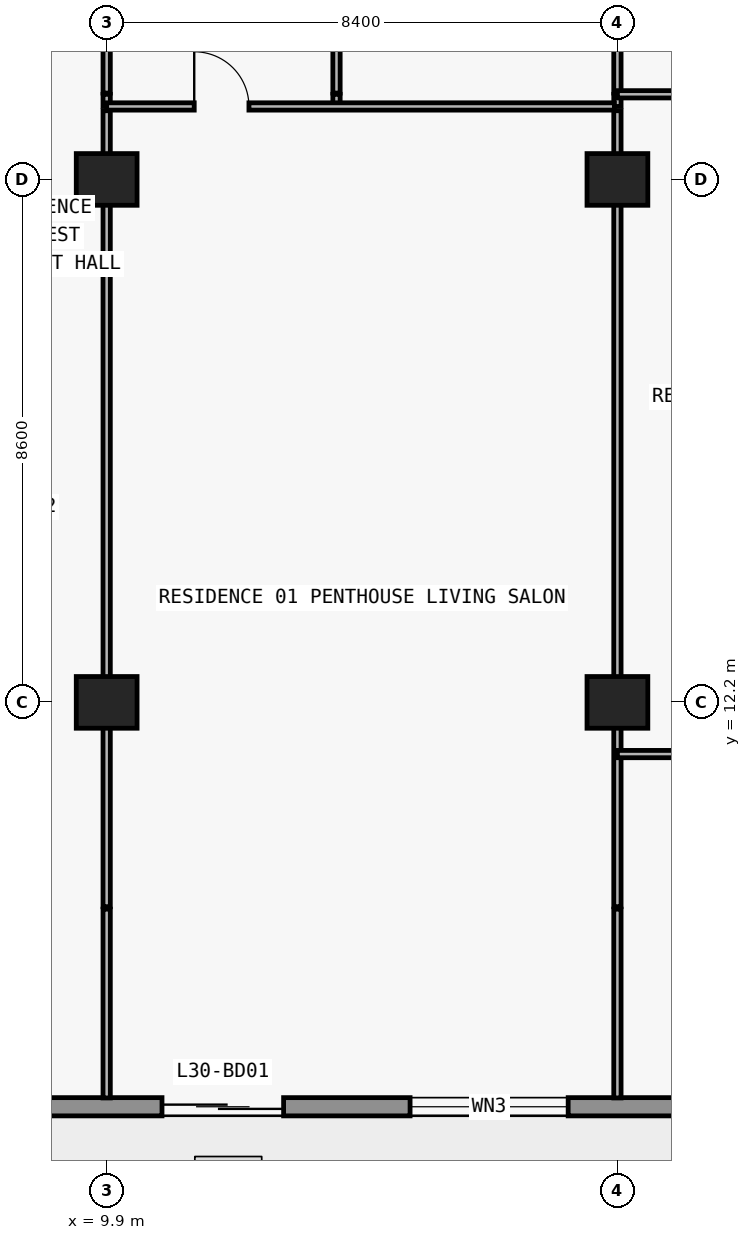
"""IFC4 building model, lengths in metres.
Left out: names, types, materials, properties, quantities, classifications, styles, units other than length and angle.
Written with IfcOpenShell. Run it as: python <this file> out.ifc"""

import sys

from ifc_helpers import new_model, si_unit, direction, frame, frame_2d, origin, origin_2d, place, context, subcontext, project, spatial, rectangle, extrude, element, fill, save


model = new_model("IFC4")
c1 = context("Model", 3, precision=1e-05, world=origin(), true_north=direction((0.0, 1.0)))
c2 = subcontext(c1, "Body", "Model", "MODEL_VIEW")
j1 = project(units=[si_unit("LENGTHUNIT", "METRE"), si_unit("PLANEANGLEUNIT", "RADIAN")], contexts=[c1])
p1 = place(None, origin())
s1 = spatial("IfcSite", under=j1, at=p1, CompositionType="ELEMENT")
p2 = place(p1, origin())
s2 = spatial("IfcBuilding", under=s1, at=p2, CompositionType="ELEMENT")
p3 = place(p2, frame((0.0, 0.0, 112.5)))
s3 = spatial("IfcBuildingStorey", under=s2, at=p3, CompositionType="ELEMENT", Elevation=112.5)
for number, where, z_axis, x_axis in (
    (1, (9.9, 12.2, 0.0), (0.0, 0.0, 1.0), (1.0, 0.0, 0.0)),
    (2, (18.3, 12.2, 0.0), (0.0, 0.0, 1.0), (1.0, 0.0, 0.0)),
    (3, (9.9, 20.8, 0.0), (0.0, 0.0, 1.0), (1.0, 0.0, 0.0)),
    (4, (18.3, 20.8, 0.0), (0.0, 0.0, 1.0), (1.0, 0.0, 0.0)),
):
    element("IfcColumn", number, at=place(p3, frame(where, z_axis=z_axis, x_axis=x_axis)), inside=s3, PredefinedType="COLUMN", context=c2, shape_type="SweptSolid", body=[
        extrude(rectangle(XDim=1.0, YDim=0.85, at=origin_2d()), origin(), (0.0, 0.0, 1.0), 3.05),
    ])
p4 = place(p3, frame((70.1, 5.55, 0.0), z_axis=(0.0, 0.0, 1.0), x_axis=(-1.0, 0.0, 0.0)))
e5 = element("IfcWall", 5, at=p4, inside=s3, PredefinedType="STANDARD", context=c2, shape_type="SweptSolid", body=[
    extrude(rectangle(XDim=62.4, YDim=0.3, at=frame_2d((31.2, 0.0))), origin(), (0.0, 0.0, 1.0), 3.05),
])
p5 = place(p4, frame((57.29, 0.0, 0.0)))
e6 = element("IfcOpeningElement", 6, at=p5, cuts=e5, PredefinedType="OPENING", context=c2, shape_type="SweptSolid", body=[
    extrude(rectangle(XDim=2.0, YDim=2.3, at=frame_2d((1.0, 1.15))), frame((0.0, 0.16, 0.0), z_axis=(0.0, -1.0, 0.0), x_axis=(1.0, 0.0, 0.0)), (0.0, 0.0, 1.0), 0.32),
])
p6 = place(p4, frame((52.61, 0.0, 0.65)))
e7 = element("IfcOpeningElement", 7, at=p6, cuts=e5, PredefinedType="OPENING", context=c2, shape_type="SweptSolid", body=[
    extrude(rectangle(XDim=2.6, YDim=1.85, at=frame_2d((1.3, 0.925))), frame((0.0, 0.16, 0.0), z_axis=(0.0, -1.0, 0.0), x_axis=(1.0, 0.0, 0.0)), (0.0, 0.0, 1.0), 0.32),
])
p7 = place(p4, frame((46.5, 0.0, 0.85)))
e8 = element("IfcOpeningElement", 8, at=p7, cuts=e5, PredefinedType="OPENING", context=c2, shape_type="SweptSolid", body=[
    extrude(rectangle(XDim=2.2, YDim=1.55, at=frame_2d((1.1, 0.775))), frame((0.0, 0.16, 0.0), z_axis=(0.0, -1.0, 0.0), x_axis=(1.0, 0.0, 0.0)), (0.0, 0.0, 1.0), 0.32),
])
p8 = place(p4, frame((40.49, 0.0, 0.0)))
e9 = element("IfcOpeningElement", 9, at=p8, cuts=e5, PredefinedType="OPENING", context=c2, shape_type="SweptSolid", body=[
    extrude(rectangle(XDim=2.0, YDim=2.3, at=frame_2d((1.0, 1.15))), frame((0.0, 0.16, 0.0), z_axis=(0.0, -1.0, 0.0), x_axis=(1.0, 0.0, 0.0)), (0.0, 0.0, 1.0), 0.32),
])
p9 = place(p4, frame((35.81, 0.0, 0.65)))
e10 = element("IfcOpeningElement", 10, at=p9, cuts=e5, PredefinedType="OPENING", context=c2, shape_type="SweptSolid", body=[
    extrude(rectangle(XDim=2.6, YDim=1.85, at=frame_2d((1.3, 0.925))), frame((0.0, 0.16, 0.0), z_axis=(0.0, -1.0, 0.0), x_axis=(1.0, 0.0, 0.0)), (0.0, 0.0, 1.0), 0.32),
])
p10 = place(p4, frame((30.1, 0.0, 0.85)))
e11 = element("IfcOpeningElement", 11, at=p10, cuts=e5, PredefinedType="OPENING", context=c2, shape_type="SweptSolid", body=[
    extrude(rectangle(XDim=2.2, YDim=1.55, at=frame_2d((1.1, 0.775))), frame((0.0, 0.16, 0.0), z_axis=(0.0, -1.0, 0.0), x_axis=(1.0, 0.0, 0.0)), (0.0, 0.0, 1.0), 0.32),
])
p11 = place(p4, frame((24.426, 0.0, 0.0)))
e12 = element("IfcOpeningElement", 12, at=p11, cuts=e5, PredefinedType="OPENING", context=c2, shape_type="SweptSolid", body=[
    extrude(rectangle(XDim=2.0, YDim=2.3, at=frame_2d((1.0, 1.15))), frame((0.0, 0.16, 0.0), z_axis=(0.0, -1.0, 0.0), x_axis=(1.0, 0.0, 0.0)), (0.0, 0.0, 1.0), 0.32),
])
p12 = place(p4, frame((20.126, 0.0, 0.85)))
e13 = element("IfcOpeningElement", 13, at=p12, cuts=e5, PredefinedType="OPENING", context=c2, shape_type="SweptSolid", body=[
    extrude(rectangle(XDim=2.2, YDim=1.55, at=frame_2d((1.1, 0.775))), frame((0.0, 0.16, 0.0), z_axis=(0.0, -1.0, 0.0), x_axis=(1.0, 0.0, 0.0)), (0.0, 0.0, 1.0), 0.32),
])
p13 = place(p4, frame((15.69, 0.0, 0.0)))
e14 = element("IfcOpeningElement", 14, at=p13, cuts=e5, PredefinedType="OPENING", context=c2, shape_type="SweptSolid", body=[
    extrude(rectangle(XDim=2.0, YDim=2.3, at=frame_2d((1.0, 1.15))), frame((0.0, 0.16, 0.0), z_axis=(0.0, -1.0, 0.0), x_axis=(1.0, 0.0, 0.0)), (0.0, 0.0, 1.0), 0.32),
])
p14 = place(p4, frame((11.59, 0.0, 0.85)))
e15 = element("IfcOpeningElement", 15, at=p14, cuts=e5, PredefinedType="OPENING", context=c2, shape_type="SweptSolid", body=[
    extrude(rectangle(XDim=1.8, YDim=1.55, at=frame_2d((0.9, 0.775))), frame((0.0, 0.16, 0.0), z_axis=(0.0, -1.0, 0.0), x_axis=(1.0, 0.0, 0.0)), (0.0, 0.0, 1.0), 0.32),
])
p15 = place(p4, frame((7.626, 0.0, 0.0)))
e16 = element("IfcOpeningElement", 16, at=p15, cuts=e5, PredefinedType="OPENING", context=c2, shape_type="SweptSolid", body=[
    extrude(rectangle(XDim=2.0, YDim=2.3, at=frame_2d((1.0, 1.15))), frame((0.0, 0.16, 0.0), z_axis=(0.0, -1.0, 0.0), x_axis=(1.0, 0.0, 0.0)), (0.0, 0.0, 1.0), 0.32),
])
p16 = place(p4, frame((3.326, 0.0, 0.85)))
e17 = element("IfcOpeningElement", 17, at=p16, cuts=e5, PredefinedType="OPENING", context=c2, shape_type="SweptSolid", body=[
    extrude(rectangle(XDim=2.2, YDim=1.55, at=frame_2d((1.1, 0.775))), frame((0.0, 0.16, 0.0), z_axis=(0.0, -1.0, 0.0), x_axis=(1.0, 0.0, 0.0)), (0.0, 0.0, 1.0), 0.32),
])
p17 = place(p3, frame((9.9, 5.695, 0.0), z_axis=(0.0, 0.0, 1.0), x_axis=(0.0, 1.0, 0.0)))
e18 = element("IfcWall", 18, at=p17, inside=s3, PredefinedType="PARTITIONING", context=c2, shape_type="SweptSolid", body=[
    extrude(rectangle(XDim=3.105, YDim=0.12, at=frame_2d((1.552, 0.0))), origin(), (0.0, 0.0, 1.0), 3.05),
])
p18 = place(p3, frame((9.9, 8.84, 0.0), z_axis=(0.0, 0.0, 1.0), x_axis=(0.0, 1.0, 0.0)))
e19 = element("IfcWall", 19, at=p18, inside=s3, PredefinedType="PARTITIONING", context=c2, shape_type="SweptSolid", body=[
    extrude(rectangle(XDim=13.09, YDim=0.12, at=frame_2d((6.545, 0.0))), origin(), (0.0, 0.0, 1.0), 2.174),
])
p19 = place(p3, frame((9.9, 22.0, 0.0), z_axis=(0.0, 0.0, 1.0), x_axis=(0.0, 1.0, 0.0)))
e20 = element("IfcWall", 20, at=p19, inside=s3, PredefinedType="PARTITIONING", context=c2, shape_type="SweptSolid", body=[
    extrude(rectangle(XDim=0.2, YDim=0.12, at=frame_2d((0.1, 0.0))), origin(), (0.0, 0.0, 1.0), 2.174),
])
p20 = place(p3, frame((9.9, 22.22, 0.0), z_axis=(0.0, 0.0, 1.0), x_axis=(0.0, 1.0, 0.0)))
e21 = element("IfcWall", 21, at=p20, inside=s3, PredefinedType="PARTITIONING", context=c2, shape_type="SweptSolid", body=[
    extrude(rectangle(XDim=4.38, YDim=0.12, at=frame_2d((2.19, 0.0))), origin(), (0.0, 0.0, 1.0), 2.174),
])
p21 = place(p20, frame((1.74, 0.0, 0.0)))
e22 = element("IfcOpeningElement", 22, at=p21, cuts=e21, PredefinedType="OPENING", context=c2, shape_type="SweptSolid", body=[
    extrude(rectangle(XDim=0.9, YDim=2.124, at=frame_2d((0.45, 1.062))), frame((0.0, 0.07, 0.0), z_axis=(0.0, -1.0, 0.0), x_axis=(1.0, 0.0, 0.0)), (0.0, 0.0, 1.0), 0.14),
])
p22 = place(p3, frame((13.68, 22.0, 0.0), z_axis=(0.0, 0.0, 1.0), x_axis=(0.0, 1.0, 0.0)))
e23 = element("IfcWall", 23, at=p22, inside=s3, PredefinedType="PARTITIONING", context=c2, shape_type="SweptSolid", body=[
    extrude(rectangle(XDim=0.2, YDim=0.12, at=frame_2d((0.1, 0.0))), origin(), (0.0, 0.0, 1.0), 3.05),
])
p23 = place(p3, frame((13.68, 22.22, 0.0), z_axis=(0.0, 0.0, 1.0), x_axis=(0.0, 1.0, 0.0)))
e24 = element("IfcWall", 24, at=p23, inside=s3, PredefinedType="PARTITIONING", context=c2, shape_type="SweptSolid", body=[
    extrude(rectangle(XDim=4.38, YDim=0.12, at=frame_2d((2.19, 0.0))), origin(), (0.0, 0.0, 1.0), 3.05),
])
p24 = place(p23, frame((1.74, 0.0, 0.0)))
e25 = element("IfcOpeningElement", 25, at=p24, cuts=e24, PredefinedType="OPENING", context=c2, shape_type="SweptSolid", body=[
    extrude(rectangle(XDim=0.9, YDim=2.15, at=frame_2d((0.45, 1.075))), frame((0.0, 0.07, 0.0), z_axis=(0.0, -1.0, 0.0), x_axis=(1.0, 0.0, 0.0)), (0.0, 0.0, 1.0), 0.14),
])
p25 = place(p3, frame((18.3, 5.695, 0.0), z_axis=(0.0, 0.0, 1.0), x_axis=(0.0, 1.0, 0.0)))
e26 = element("IfcWall", 26, at=p25, inside=s3, PredefinedType="PARTITIONING", context=c2, shape_type="SweptSolid", body=[
    extrude(rectangle(XDim=3.105, YDim=0.12, at=frame_2d((1.552, 0.0))), origin(), (0.0, 0.0, 1.0), 3.05),
])
p26 = place(p3, frame((18.3, 8.84, 0.0), z_axis=(0.0, 0.0, 1.0), x_axis=(0.0, 1.0, 0.0)))
e27 = element("IfcWall", 27, at=p26, inside=s3, PredefinedType="PARTITIONING", context=c2, shape_type="SweptSolid", body=[
    extrude(rectangle(XDim=13.09, YDim=0.12, at=frame_2d((6.545, 0.0))), origin(), (0.0, 0.0, 1.0), 2.174),
])
p27 = place(p3, frame((18.3, 22.0, 0.0), z_axis=(0.0, 0.0, 1.0), x_axis=(0.0, 1.0, 0.0)))
e28 = element("IfcWall", 28, at=p27, inside=s3, PredefinedType="PARTITIONING", context=c2, shape_type="SweptSolid", body=[
    extrude(rectangle(XDim=0.2, YDim=0.12, at=frame_2d((0.1, 0.0))), origin(), (0.0, 0.0, 1.0), 2.174),
])
p28 = place(p3, frame((18.3, 22.22, 0.0), z_axis=(0.0, 0.0, 1.0), x_axis=(0.0, 1.0, 0.0)))
e29 = element("IfcWall", 29, at=p28, inside=s3, PredefinedType="PARTITIONING", context=c2, shape_type="SweptSolid", body=[
    extrude(rectangle(XDim=4.38, YDim=0.12, at=frame_2d((2.19, 0.0))), origin(), (0.0, 0.0, 1.0), 2.174),
])
p29 = place(p28, frame((1.74, 0.0, 0.0)))
e30 = element("IfcOpeningElement", 30, at=p29, cuts=e29, PredefinedType="OPENING", context=c2, shape_type="SweptSolid", body=[
    extrude(rectangle(XDim=0.9, YDim=2.124, at=frame_2d((0.45, 1.062))), frame((0.0, 0.07, 0.0), z_axis=(0.0, -1.0, 0.0), x_axis=(1.0, 0.0, 0.0)), (0.0, 0.0, 1.0), 0.14),
])
p30 = place(p3, frame((18.3, 11.35, 0.0), z_axis=(0.0, 0.0, 1.0), x_axis=(1.0, 0.0, 0.0)))
e31 = element("IfcWall", 31, at=p30, inside=s3, PredefinedType="PARTITIONING", context=c2, shape_type="SweptSolid", body=[
    extrude(rectangle(XDim=8.4, YDim=0.12, at=frame_2d((4.2, 0.0))), origin(), (0.0, 0.0, 1.0), 3.05),
])
p31 = place(p30, frame((3.75, 0.0, 0.0)))
e32 = element("IfcOpeningElement", 32, at=p31, cuts=e31, PredefinedType="OPENING", context=c2, shape_type="SweptSolid", body=[
    extrude(rectangle(XDim=0.9, YDim=2.15, at=frame_2d((0.45, 1.075))), frame((0.0, 0.07, 0.0), z_axis=(0.0, -1.0, 0.0), x_axis=(1.0, 0.0, 0.0)), (0.0, 0.0, 1.0), 0.14),
])
p32 = place(p3, frame((9.9, 22.0, 0.0), z_axis=(0.0, 0.0, 1.0), x_axis=(1.0, 0.0, 0.0)))
e33 = element("IfcWall", 33, at=p32, inside=s3, PredefinedType="PARTITIONING", context=c2, shape_type="SweptSolid", body=[
    extrude(rectangle(XDim=8.35, YDim=0.12, at=frame_2d((4.175, 0.0))), origin(), (0.0, 0.0, 1.0), 3.05),
])
p33 = place(p32, frame((1.44, 0.0, 0.0)))
e34 = element("IfcOpeningElement", 34, at=p33, cuts=e33, PredefinedType="OPENING", context=c2, shape_type="SweptSolid", body=[
    extrude(rectangle(XDim=0.9, YDim=2.15, at=frame_2d((0.45, 1.075))), frame((0.0, 0.07, 0.0), z_axis=(0.0, -1.0, 0.0), x_axis=(1.0, 0.0, 0.0)), (0.0, 0.0, 1.0), 0.14),
])
p34 = place(p3, frame((18.3, 22.2, 0.0), z_axis=(0.0, 0.0, 1.0), x_axis=(1.0, 0.0, 0.0)))
e35 = element("IfcWall", 35, at=p34, inside=s3, PredefinedType="PARTITIONING", context=c2, shape_type="SweptSolid", body=[
    extrude(rectangle(XDim=8.18, YDim=0.12, at=frame_2d((4.09, 0.0))), origin(), (0.0, 0.0, 1.0), 3.05),
])
p35 = place(p34, frame((3.64, 0.0, 0.0)))
e36 = element("IfcOpeningElement", 36, at=p35, cuts=e35, PredefinedType="OPENING", context=c2, shape_type="SweptSolid", body=[
    extrude(rectangle(XDim=0.9, YDim=2.15, at=frame_2d((0.45, 1.075))), frame((0.0, 0.07, 0.0), z_axis=(0.0, -1.0, 0.0), x_axis=(1.0, 0.0, 0.0)), (0.0, 0.0, 1.0), 0.14),
])
p36 = place(p5, origin())
e37 = element("IfcDoor", 37, at=p36, inside=s3, OperationType="DOUBLE_DOOR_SLIDING", PredefinedType="DOOR", context=c2, shape_type="SweptSolid", body=[
    extrude(rectangle(XDim=2.0, YDim=2.3, at=frame_2d((1.0, 1.15))), frame((0.0, 0.025, 0.0), z_axis=(0.0, -1.0, 0.0), x_axis=(1.0, 0.0, 0.0)), (0.0, 0.0, 1.0), 0.05),
])
fill(e6, e37)
p37 = place(p6, origin())
e38 = element("IfcWindow", 38, at=p37, inside=s3, PartitioningType="SINGLE_PANEL", PredefinedType="WINDOW", context=c2, shape_type="SweptSolid", body=[
    extrude(rectangle(XDim=2.6, YDim=1.85, at=frame_2d((1.3, 0.925))), frame((0.0, 0.03, 0.0), z_axis=(0.0, -1.0, 0.0), x_axis=(1.0, 0.0, 0.0)), (0.0, 0.0, 1.0), 0.06),
])
fill(e7, e38)
p38 = place(p33, origin())
e39 = element("IfcDoor", 39, at=p38, inside=s3, OperationType="SINGLE_SWING_LEFT", PredefinedType="DOOR", context=c2, shape_type="SweptSolid", body=[
    extrude(rectangle(XDim=0.9, YDim=2.15, at=frame_2d((0.45, 1.075))), frame((0.0, 0.025, 0.0), z_axis=(0.0, -1.0, 0.0), x_axis=(1.0, 0.0, 0.0)), (0.0, 0.0, 1.0), 0.05),
])
fill(e34, e39)
save(model, sys.argv[1])
